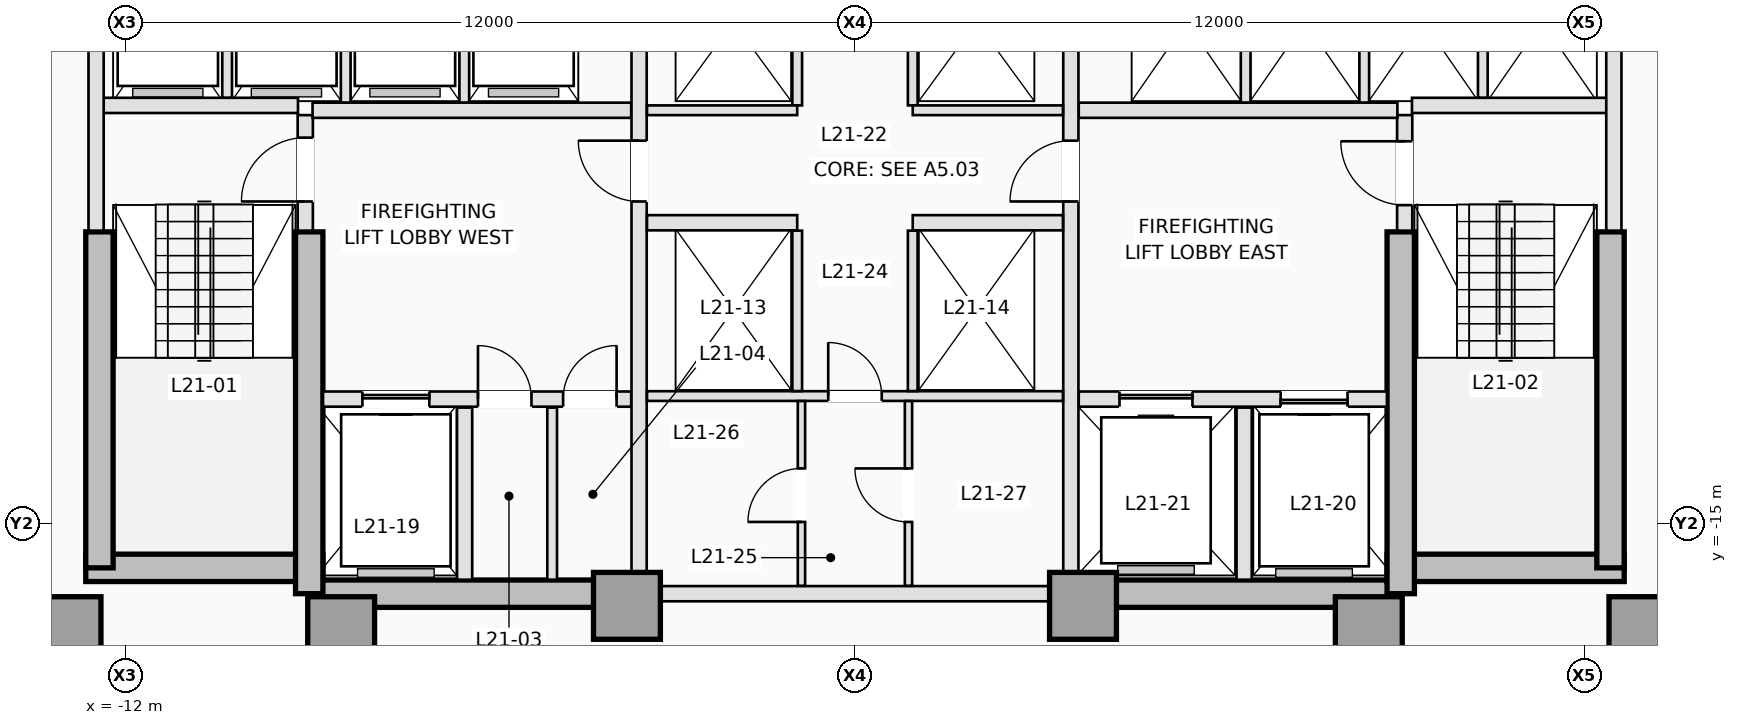
"""IFC4 building model, lengths in metres.
Left out: names, types, materials, properties, quantities, classifications, styles, units other than length and angle.
Written with IfcOpenShell. Run it as: python <this file> out.ifc"""

import sys

from ifc_helpers import new_model, si_unit, direction, frame, frame_2d, origin, origin_2d, place, context, subcontext, project, spatial, rectangle, extrude, element, fill, save


model = new_model("IFC4")
c1 = context("Model", 3, precision=1e-05, world=origin(), true_north=direction((0.0, 1.0)))
c2 = subcontext(c1, "Body", "Model", "MODEL_VIEW")
j1 = project(units=[si_unit("LENGTHUNIT", "METRE"), si_unit("PLANEANGLEUNIT", "RADIAN")], contexts=[c1])
p1 = place(None, origin())
s1 = spatial("IfcSite", under=j1, at=p1, CompositionType="ELEMENT")
p2 = place(p1, origin())
s2 = spatial("IfcBuilding", under=s1, at=p2, CompositionType="ELEMENT")
p3 = place(p2, frame((0.0, 0.0, 80.1)))
s3 = spatial("IfcBuildingStorey", under=s2, at=p3, CompositionType="ELEMENT", Elevation=80.1)
p4 = place(p3, frame((-12.65, -15.725, 0.0), z_axis=(0.0, 0.0, 1.0), x_axis=(1.0, 0.0, 0.0)))
e1 = element("IfcWall", 1, at=p4, inside=s3, PredefinedType="SHEAR", context=c2, shape_type="SweptSolid", body=[
    extrude(rectangle(XDim=3.9, YDim=0.45, at=frame_2d((1.95, 0.0))), origin(), (0.0, 0.0, 1.0), 3.5),
])
for number, where, z_axis, x_axis in (
    (2, (-8.975, -16.15, 0.0), (0.0, 0.0, 1.0), (1.0, 0.0, 0.0)),
    (3, (3.75, -16.15, 0.0), (0.0, 0.0, 1.0), (1.0, 0.0, 0.0)),
):
    element("IfcWall", number, at=place(p3, frame(where, z_axis=z_axis, x_axis=x_axis)), inside=s3, PredefinedType="SHEAR", context=c2, shape_type="SweptSolid", body=[
        extrude(rectangle(XDim=5.225, YDim=0.45, at=frame_2d((2.613, 0.0))), origin(), (0.0, 0.0, 1.0), 3.5),
    ])
p5 = place(p3, frame((8.75, -15.725, 0.0), z_axis=(0.0, 0.0, 1.0), x_axis=(1.0, 0.0, 0.0)))
e4 = element("IfcWall", 4, at=p5, inside=s3, PredefinedType="SHEAR", context=c2, shape_type="SweptSolid", body=[
    extrude(rectangle(XDim=3.9, YDim=0.45, at=frame_2d((1.95, 0.0))), origin(), (0.0, 0.0, 1.0), 3.5),
])
for number, where, z_axis, x_axis in (
    (5, (-12.425, -15.725, 0.0), (0.0, 0.0, 1.0), (0.0, 1.0, 0.0)),
    (6, (12.425, -15.725, 0.0), (0.0, 0.0, 1.0), (0.0, 1.0, 0.0)),
):
    element("IfcWall", number, at=place(p3, frame(where, z_axis=z_axis, x_axis=x_axis)), inside=s3, PredefinedType="SHEAR", context=c2, shape_type="SweptSolid", body=[
        extrude(rectangle(XDim=5.525, YDim=0.45, at=frame_2d((2.763, 0.0))), origin(), (0.0, 0.0, 1.0), 3.5),
    ])
for number, where, z_axis, x_axis in (
    (7, (-8.975, -16.15, 0.0), (0.0, 0.0, 1.0), (0.0, 1.0, 0.0)),
    (8, (8.975, -16.15, 0.0), (0.0, 0.0, 1.0), (0.0, 1.0, 0.0)),
):
    element("IfcWall", number, at=place(p3, frame(where, z_axis=z_axis, x_axis=x_axis)), inside=s3, PredefinedType="SHEAR", context=c2, shape_type="SweptSolid", body=[
        extrude(rectangle(XDim=5.95, YDim=0.45, at=frame_2d((2.975, 0.0))), origin(), (0.0, 0.0, 1.0), 3.5),
    ])
for number, where, z_axis, x_axis in (
    (9, (-12.95, -16.75, 0.0), (0.0, 0.0, 1.0), (1.0, 0.0, 0.0)),
    (10, (-8.45, -16.75, 0.0), (0.0, 0.0, 1.0), (1.0, 0.0, 0.0)),
    (11, (-3.75, -16.35, 0.0), (0.0, 0.0, 1.0), (1.0, 0.0, 0.0)),
    (12, (3.75, -16.35, 0.0), (0.0, 0.0, 1.0), (1.0, 0.0, 0.0)),
    (13, (8.45, -16.75, 0.0), (0.0, 0.0, 1.0), (1.0, 0.0, 0.0)),
    (14, (12.95, -16.75, 0.0), (0.0, 0.0, 1.0), (1.0, 0.0, 0.0)),
):
    element("IfcColumn", number, at=place(p3, frame(where, z_axis=z_axis, x_axis=x_axis)), inside=s3, PredefinedType="COLUMN", context=c2, shape_type="SweptSolid", body=[
        extrude(rectangle(XDim=1.1, YDim=1.1, at=origin_2d()), origin(), (0.0, 0.0, 1.0), 3.5),
    ])
p6 = place(p3, frame((-9.04, -10.18, 0.0), z_axis=(0.0, 0.0, 1.0), x_axis=(0.0, 1.0, 0.0)))
e15 = element("IfcWall", 15, at=p6, inside=s3, PredefinedType="PARTITIONING", context=c2, shape_type="SweptSolid", body=[
    extrude(rectangle(XDim=1.9, YDim=0.25, at=frame_2d((0.95, 0.0))), origin(), (0.0, 0.0, 1.0), 3.25),
])
p7 = place(p6, frame((0.48, 0.0, 0.0)))
e16 = element("IfcOpeningElement", 16, at=p7, cuts=e15, PredefinedType="OPENING", context=c2, shape_type="SweptSolid", body=[
    extrude(rectangle(XDim=1.05, YDim=2.15, at=frame_2d((0.525, 1.075))), frame((0.0, 0.135, 0.0), z_axis=(0.0, -1.0, 0.0), x_axis=(1.0, 0.0, 0.0)), (0.0, 0.0, 1.0), 0.27),
])
p8 = place(p3, frame((9.04, -10.18, 0.0), z_axis=(0.0, 0.0, 1.0), x_axis=(0.0, 1.0, 0.0)))
e17 = element("IfcWall", 17, at=p8, inside=s3, PredefinedType="PARTITIONING", context=c2, shape_type="SweptSolid", body=[
    extrude(rectangle(XDim=1.9, YDim=0.25, at=frame_2d((0.95, 0.0))), origin(), (0.0, 0.0, 1.0), 3.25),
])
p9 = place(p8, frame((0.42, 0.0, 0.0)))
e18 = element("IfcOpeningElement", 18, at=p9, cuts=e17, PredefinedType="OPENING", context=c2, shape_type="SweptSolid", body=[
    extrude(rectangle(XDim=1.05, YDim=2.15, at=frame_2d((0.525, 1.075))), frame((0.0, 0.135, 0.0), z_axis=(0.0, -1.0, 0.0), x_axis=(1.0, 0.0, 0.0)), (0.0, 0.0, 1.0), 0.27),
])
for number, where, z_axis, x_axis in (
    (19, (-12.38, -8.12, 0.0), (0.0, 0.0, 1.0), (1.0, 0.0, 0.0)),
    (20, (9.16, -8.12, 0.0), (0.0, 0.0, 1.0), (1.0, 0.0, 0.0)),
):
    element("IfcWall", number, at=place(p3, frame(where, z_axis=z_axis, x_axis=x_axis)), inside=s3, PredefinedType="PARTITIONING", context=c2, shape_type="SweptSolid", body=[
        extrude(rectangle(XDim=3.22, YDim=0.25, at=frame_2d((1.61, 0.0))), origin(), (0.0, 0.0, 1.0), 3.25),
    ])
for number, where, z_axis, x_axis in (
    (21, (-12.48, -10.18, 0.0), (0.0, 0.0, 1.0), (0.0, 1.0, 0.0)),
    (22, (12.48, -10.18, 0.0), (0.0, 0.0, 1.0), (0.0, 1.0, 0.0)),
):
    element("IfcWall", number, at=place(p3, frame(where, z_axis=z_axis, x_axis=x_axis)), inside=s3, PredefinedType="PARTITIONING", context=c2, shape_type="SweptSolid", body=[
        extrude(rectangle(XDim=4.828, YDim=0.25, at=frame_2d((2.414, 0.0))), origin(), (0.0, 0.0, 1.0), 3.25),
    ])
p10 = place(p3, frame((-8.748, -12.95, 0.0), z_axis=(0.0, 0.0, 1.0), x_axis=(1.0, 0.0, 0.0)))
e23 = element("IfcWall", 23, at=p10, inside=s3, PredefinedType="PARTITIONING", context=c2, shape_type="SweptSolid", body=[
    extrude(rectangle(XDim=5.068, YDim=0.25, at=frame_2d((2.534, 0.0))), origin(), (0.0, 0.0, 1.0), 3.25),
])
p11 = place(p10, frame((0.648, 0.0, 0.0)))
e24 = element("IfcOpeningElement", 24, at=p11, cuts=e23, PredefinedType="OPENING", context=c2, shape_type="SweptSolid", body=[
    extrude(rectangle(XDim=1.1, YDim=2.15, at=frame_2d((0.55, 1.075))), frame((0.0, 0.135, 0.0), z_axis=(0.0, -1.0, 0.0), x_axis=(1.0, 0.0, 0.0)), (0.0, 0.0, 1.0), 0.27),
])
p12 = place(p10, frame((2.548, 0.0, 0.0)))
e25 = element("IfcOpeningElement", 25, at=p12, cuts=e23, PredefinedType="OPENING", context=c2, shape_type="SweptSolid", body=[
    extrude(rectangle(XDim=0.88, YDim=2.1, at=frame_2d((0.44, 1.05))), frame((0.0, 0.135, 0.0), z_axis=(0.0, -1.0, 0.0), x_axis=(1.0, 0.0, 0.0)), (0.0, 0.0, 1.0), 0.27),
])
p13 = place(p10, frame((3.948, 0.0, 0.0)))
e26 = element("IfcOpeningElement", 26, at=p13, cuts=e23, PredefinedType="OPENING", context=c2, shape_type="SweptSolid", body=[
    extrude(rectangle(XDim=0.88, YDim=2.1, at=frame_2d((0.44, 1.05))), frame((0.0, 0.135, 0.0), z_axis=(0.0, -1.0, 0.0), x_axis=(1.0, 0.0, 0.0)), (0.0, 0.0, 1.0), 0.27),
])
p14 = place(p3, frame((3.68, -12.95, 0.0), z_axis=(0.0, 0.0, 1.0), x_axis=(1.0, 0.0, 0.0)))
e27 = element("IfcWall", 27, at=p14, inside=s3, PredefinedType="PARTITIONING", context=c2, shape_type="SweptSolid", body=[
    extrude(rectangle(XDim=5.068, YDim=0.25, at=frame_2d((2.534, 0.0))), origin(), (0.0, 0.0, 1.0), 3.25),
])
p15 = place(p14, frame((3.32, 0.0, 0.0)))
e28 = element("IfcOpeningElement", 28, at=p15, cuts=e27, PredefinedType="OPENING", context=c2, shape_type="SweptSolid", body=[
    extrude(rectangle(XDim=1.1, YDim=2.15, at=frame_2d((0.55, 1.075))), frame((0.0, 0.135, 0.0), z_axis=(0.0, -1.0, 0.0), x_axis=(1.0, 0.0, 0.0)), (0.0, 0.0, 1.0), 0.27),
])
p16 = place(p14, frame((0.67, 0.0, 0.0)))
e29 = element("IfcOpeningElement", 29, at=p16, cuts=e27, PredefinedType="OPENING", context=c2, shape_type="SweptSolid", body=[
    extrude(rectangle(XDim=1.2, YDim=2.15, at=frame_2d((0.6, 1.075))), frame((0.0, 0.135, 0.0), z_axis=(0.0, -1.0, 0.0), x_axis=(1.0, 0.0, 0.0)), (0.0, 0.0, 1.0), 0.27),
])
p17 = place(p3, frame((-6.42, -15.92, 0.0), z_axis=(0.0, 0.0, 1.0), x_axis=(0.0, 1.0, 0.0)))
e30 = element("IfcWall", 30, at=p17, inside=s3, PredefinedType="PARTITIONING", context=c2, shape_type="SweptSolid", body=[
    extrude(rectangle(XDim=2.83, YDim=0.25, at=frame_2d((1.415, 0.0))), origin(), (0.0, 0.0, 1.0), 3.25),
])
p18 = place(p3, frame((-4.98, -15.92, 0.0), z_axis=(0.0, 0.0, 1.0), x_axis=(0.0, 1.0, 0.0)))
e31 = element("IfcWall", 31, at=p18, inside=s3, PredefinedType="PARTITIONING", context=c2, shape_type="SweptSolid", body=[
    extrude(rectangle(XDim=2.83, YDim=0.16, at=frame_2d((1.415, 0.0))), origin(), (0.0, 0.0, 1.0), 3.25),
])
p19 = place(p3, frame((6.4, -15.92, 0.0), z_axis=(0.0, 0.0, 1.0), x_axis=(0.0, 1.0, 0.0)))
e32 = element("IfcWall", 32, at=p19, inside=s3, PredefinedType="PARTITIONING", context=c2, shape_type="SweptSolid", body=[
    extrude(rectangle(XDim=2.83, YDim=0.25, at=frame_2d((1.415, 0.0))), origin(), (0.0, 0.0, 1.0), 3.25),
])
for number, where, z_axis, x_axis in (
    (33, (-8.92, -8.2, 0.0), (0.0, 0.0, 1.0), (1.0, 0.0, 0.0)),
    (34, (3.68, -8.2, 0.0), (0.0, 0.0, 1.0), (1.0, 0.0, 0.0)),
):
    element("IfcWall", number, at=place(p3, frame(where, z_axis=z_axis, x_axis=x_axis)), inside=s3, PredefinedType="PARTITIONING", context=c2, shape_type="SweptSolid", body=[
        extrude(rectangle(XDim=5.24, YDim=0.25, at=frame_2d((2.62, 0.0))), origin(), (0.0, 0.0, 1.0), 3.25),
    ])
p20 = place(p3, frame((-3.55, -15.798, 0.0), z_axis=(0.0, 0.0, 1.0), x_axis=(0.0, 1.0, 0.0)))
e35 = element("IfcWall", 35, at=p20, inside=s3, PredefinedType="PARTITIONING", context=c2, shape_type="SweptSolid", body=[
    extrude(rectangle(XDim=10.446, YDim=0.25, at=frame_2d((5.223, 0.0))), origin(), (0.0, 0.0, 1.0), 3.25),
])
p21 = place(p20, frame((6.098, 0.0, 0.0)))
e36 = element("IfcOpeningElement", 36, at=p21, cuts=e35, PredefinedType="OPENING", context=c2, shape_type="SweptSolid", body=[
    extrude(rectangle(XDim=1.0, YDim=2.15, at=frame_2d((0.5, 1.075))), frame((0.0, 0.135, 0.0), z_axis=(0.0, -1.0, 0.0), x_axis=(1.0, 0.0, 0.0)), (0.0, 0.0, 1.0), 0.27),
])
p22 = place(p3, frame((3.55, -15.798, 0.0), z_axis=(0.0, 0.0, 1.0), x_axis=(0.0, 1.0, 0.0)))
e37 = element("IfcWall", 37, at=p22, inside=s3, PredefinedType="PARTITIONING", context=c2, shape_type="SweptSolid", body=[
    extrude(rectangle(XDim=10.446, YDim=0.25, at=frame_2d((5.223, 0.0))), origin(), (0.0, 0.0, 1.0), 3.25),
])
p23 = place(p22, frame((6.098, 0.0, 0.0)))
e38 = element("IfcOpeningElement", 38, at=p23, cuts=e37, PredefinedType="OPENING", context=c2, shape_type="SweptSolid", body=[
    extrude(rectangle(XDim=1.0, YDim=2.15, at=frame_2d((0.5, 1.075))), frame((0.0, 0.135, 0.0), z_axis=(0.0, -1.0, 0.0), x_axis=(1.0, 0.0, 0.0)), (0.0, 0.0, 1.0), 0.27),
])
p24 = place(p3, frame((-10.325, -7.993, 0.0), z_axis=(0.0, 0.0, 1.0), x_axis=(0.0, 1.0, 0.0)))
e39 = element("IfcWall", 39, at=p24, inside=s3, PredefinedType="PARTITIONING", context=c2, shape_type="SweptSolid", body=[
    extrude(rectangle(XDim=2.653, YDim=0.16, at=frame_2d((1.326, 0.0))), origin(), (0.0, 0.0, 1.0), 3.25),
])
for number, where, z_axis, x_axis in (
    (40, (-8.375, -8.073, 0.0), (0.0, 0.0, 1.0), (0.0, 1.0, 0.0)),
    (41, (-6.425, -8.073, 0.0), (0.0, 0.0, 1.0), (0.0, 1.0, 0.0)),
    (42, (6.425, -8.073, 0.0), (0.0, 0.0, 1.0), (0.0, 1.0, 0.0)),
    (43, (8.375, -8.073, 0.0), (0.0, 0.0, 1.0), (0.0, 1.0, 0.0)),
):
    element("IfcWall", number, at=place(p3, frame(where, z_axis=z_axis, x_axis=x_axis)), inside=s3, PredefinedType="PARTITIONING", context=c2, shape_type="SweptSolid", body=[
        extrude(rectangle(XDim=2.733, YDim=0.16, at=frame_2d((1.366, 0.0))), origin(), (0.0, 0.0, 1.0), 3.25),
    ])
p25 = place(p3, frame((10.325, -7.993, 0.0), z_axis=(0.0, 0.0, 1.0), x_axis=(0.0, 1.0, 0.0)))
e44 = element("IfcWall", 44, at=p25, inside=s3, PredefinedType="PARTITIONING", context=c2, shape_type="SweptSolid", body=[
    extrude(rectangle(XDim=2.653, YDim=0.16, at=frame_2d((1.326, 0.0))), origin(), (0.0, 0.0, 1.0), 3.25),
])
p26 = place(p3, frame((-3.198, -16.15, 0.0), z_axis=(0.0, 0.0, 1.0), x_axis=(1.0, 0.0, 0.0)))
e45 = element("IfcWall", 45, at=p26, inside=s3, PredefinedType="PARTITIONING", context=c2, shape_type="SweptSolid", body=[
    extrude(rectangle(XDim=6.396, YDim=0.25, at=frame_2d((3.198, 0.0))), origin(), (0.0, 0.0, 1.0), 2.3),
])
for number, where, z_axis, x_axis in (
    (46, (-0.95, -8.12, 0.0), (0.0, 0.0, 1.0), (0.0, 1.0, 0.0)),
    (47, (0.95, -8.12, 0.0), (0.0, 0.0, 1.0), (0.0, 1.0, 0.0)),
):
    element("IfcWall", number, at=place(p3, frame(where, z_axis=z_axis, x_axis=x_axis)), inside=s3, PredefinedType="PARTITIONING", context=c2, shape_type="SweptSolid", body=[
        extrude(rectangle(XDim=2.78, YDim=0.16, at=frame_2d((1.39, 0.0))), origin(), (0.0, 0.0, 1.0), 3.25),
    ])
for number, where, z_axis, x_axis in (
    (48, (-3.42, -8.2, 0.0), (0.0, 0.0, 1.0), (1.0, 0.0, 0.0)),
    (49, (0.95, -8.2, 0.0), (0.0, 0.0, 1.0), (1.0, 0.0, 0.0)),
):
    element("IfcWall", number, at=place(p3, frame(where, z_axis=z_axis, x_axis=x_axis)), inside=s3, PredefinedType="PARTITIONING", context=c2, shape_type="SweptSolid", body=[
        extrude(rectangle(XDim=2.47, YDim=0.16, at=frame_2d((1.235, 0.0))), origin(), (0.0, 0.0, 1.0), 3.25),
    ])
for number, where, z_axis, x_axis in (
    (50, (-3.42, -10.05, 0.0), (0.0, 0.0, 1.0), (1.0, 0.0, 0.0)),
    (51, (0.95, -10.05, 0.0), (0.0, 0.0, 1.0), (1.0, 0.0, 0.0)),
):
    element("IfcWall", number, at=place(p3, frame(where, z_axis=z_axis, x_axis=x_axis)), inside=s3, PredefinedType="PARTITIONING", context=c2, shape_type="SweptSolid", body=[
        extrude(rectangle(XDim=2.47, YDim=0.25, at=frame_2d((1.235, 0.0))), origin(), (0.0, 0.0, 1.0), 3.25),
    ])
p27 = place(p3, frame((-3.42, -12.9, 0.0), z_axis=(0.0, 0.0, 1.0), x_axis=(1.0, 0.0, 0.0)))
e52 = element("IfcWall", 52, at=p27, inside=s3, PredefinedType="PARTITIONING", context=c2, shape_type="SweptSolid", body=[
    extrude(rectangle(XDim=6.84, YDim=0.16, at=frame_2d((3.42, 0.0))), origin(), (0.0, 0.0, 1.0), 3.25),
])
p28 = place(p27, frame((2.98, 0.0, 0.0)))
e53 = element("IfcOpeningElement", 53, at=p28, cuts=e52, PredefinedType="OPENING", context=c2, shape_type="SweptSolid", body=[
    extrude(rectangle(XDim=0.88, YDim=2.12, at=frame_2d((0.44, 1.06))), frame((0.0, 0.09, 0.0), z_axis=(0.0, -1.0, 0.0), x_axis=(1.0, 0.0, 0.0)), (0.0, 0.0, 1.0), 0.18),
])
for number, where, z_axis, x_axis in (
    (54, (-0.95, -12.818, 0.0), (0.0, 0.0, 1.0), (0.0, 1.0, 0.0)),
    (55, (0.95, -12.818, 0.0), (0.0, 0.0, 1.0), (0.0, 1.0, 0.0)),
):
    element("IfcWall", number, at=place(p3, frame(where, z_axis=z_axis, x_axis=x_axis)), inside=s3, PredefinedType="PARTITIONING", context=c2, shape_type="SweptSolid", body=[
        extrude(rectangle(XDim=2.638, YDim=0.16, at=frame_2d((1.319, 0.0))), origin(), (0.0, 0.0, 1.0), 3.25),
    ])
p29 = place(p3, frame((-0.88, -16.02, 0.0), z_axis=(0.0, 0.0, 1.0), x_axis=(0.0, 1.0, 0.0)))
e56 = element("IfcWall", 56, at=p29, inside=s3, PredefinedType="PARTITIONING", context=c2, shape_type="SweptSolid", body=[
    extrude(rectangle(XDim=3.038, YDim=0.12, at=frame_2d((1.519, 0.0))), origin(), (0.0, 0.0, 1.0), 3.25),
])
p30 = place(p29, frame((1.05, 0.0, 0.0)))
e57 = element("IfcOpeningElement", 57, at=p30, cuts=e56, PredefinedType="OPENING", context=c2, shape_type="SweptSolid", body=[
    extrude(rectangle(XDim=0.88, YDim=2.12, at=frame_2d((0.44, 1.06))), frame((0.0, 0.07, 0.0), z_axis=(0.0, -1.0, 0.0), x_axis=(1.0, 0.0, 0.0)), (0.0, 0.0, 1.0), 0.14),
])
p31 = place(p3, frame((0.88, -16.02, 0.0), z_axis=(0.0, 0.0, 1.0), x_axis=(0.0, 1.0, 0.0)))
e58 = element("IfcWall", 58, at=p31, inside=s3, PredefinedType="PARTITIONING", context=c2, shape_type="SweptSolid", body=[
    extrude(rectangle(XDim=3.038, YDim=0.12, at=frame_2d((1.519, 0.0))), origin(), (0.0, 0.0, 1.0), 3.25),
])
p32 = place(p31, frame((1.05, 0.0, 0.0)))
e59 = element("IfcOpeningElement", 59, at=p32, cuts=e58, PredefinedType="OPENING", context=c2, shape_type="SweptSolid", body=[
    extrude(rectangle(XDim=0.88, YDim=2.12, at=frame_2d((0.44, 1.06))), frame((0.0, 0.07, 0.0), z_axis=(0.0, -1.0, 0.0), x_axis=(1.0, 0.0, 0.0)), (0.0, 0.0, 1.0), 0.14),
])
p33 = place(p11, origin())
e60 = element("IfcDoor", 60, at=p33, inside=s3, OperationType="SLIDING_TO_LEFT", PredefinedType="DOOR", context=c2, shape_type="SweptSolid", body=[
    extrude(rectangle(XDim=1.1, YDim=2.15, at=frame_2d((0.55, 1.075))), frame((0.0, 0.025, 0.0), z_axis=(0.0, -1.0, 0.0), x_axis=(1.0, 0.0, 0.0)), (0.0, 0.0, 1.0), 0.05),
])
fill(e24, e60)
p34 = place(p15, origin())
e61 = element("IfcDoor", 61, at=p34, inside=s3, OperationType="SLIDING_TO_RIGHT", PredefinedType="DOOR", context=c2, shape_type="SweptSolid", body=[
    extrude(rectangle(XDim=1.1, YDim=2.15, at=frame_2d((0.55, 1.075))), frame((0.0, 0.025, 0.0), z_axis=(0.0, -1.0, 0.0), x_axis=(1.0, 0.0, 0.0)), (0.0, 0.0, 1.0), 0.05),
])
fill(e28, e61)
p35 = place(p16, origin())
e62 = element("IfcDoor", 62, at=p35, inside=s3, OperationType="SLIDING_TO_LEFT", PredefinedType="DOOR", context=c2, shape_type="SweptSolid", body=[
    extrude(rectangle(XDim=1.2, YDim=2.15, at=frame_2d((0.6, 1.075))), frame((0.0, 0.025, 0.0), z_axis=(0.0, -1.0, 0.0), x_axis=(1.0, 0.0, 0.0)), (0.0, 0.0, 1.0), 0.05),
])
fill(e29, e62)
p36 = place(p7, origin())
e63 = element("IfcDoor", 63, at=p36, inside=s3, OperationType="SINGLE_SWING_LEFT", PredefinedType="DOOR", context=c2, shape_type="SweptSolid", body=[
    extrude(rectangle(XDim=1.05, YDim=2.15, at=frame_2d((0.525, 1.075))), frame((0.0, 0.025, 0.0), z_axis=(0.0, -1.0, 0.0), x_axis=(1.0, 0.0, 0.0)), (0.0, 0.0, 1.0), 0.05),
])
fill(e16, e63)
p37 = place(p9, origin())
e64 = element("IfcDoor", 64, at=p37, inside=s3, OperationType="SINGLE_SWING_RIGHT", PredefinedType="DOOR", context=c2, shape_type="SweptSolid", body=[
    extrude(rectangle(XDim=1.05, YDim=2.15, at=frame_2d((0.525, 1.075))), frame((0.0, 0.025, 0.0), z_axis=(0.0, -1.0, 0.0), x_axis=(1.0, 0.0, 0.0)), (0.0, 0.0, 1.0), 0.05),
])
fill(e18, e64)
p38 = place(p12, origin())
e65 = element("IfcDoor", 65, at=p38, inside=s3, OperationType="SINGLE_SWING_LEFT", PredefinedType="TRAPDOOR", context=c2, shape_type="SweptSolid", body=[
    extrude(rectangle(XDim=0.88, YDim=2.1, at=frame_2d((0.44, 1.05))), frame((0.0, 0.025, 0.0), z_axis=(0.0, -1.0, 0.0), x_axis=(1.0, 0.0, 0.0)), (0.0, 0.0, 1.0), 0.05),
])
fill(e25, e65)
p39 = place(p13, origin())
e66 = element("IfcDoor", 66, at=p39, inside=s3, OperationType="SINGLE_SWING_RIGHT", PredefinedType="TRAPDOOR", context=c2, shape_type="SweptSolid", body=[
    extrude(rectangle(XDim=0.88, YDim=2.1, at=frame_2d((0.44, 1.05))), frame((0.0, 0.025, 0.0), z_axis=(0.0, -1.0, 0.0), x_axis=(1.0, 0.0, 0.0)), (0.0, 0.0, 1.0), 0.05),
])
fill(e26, e66)
p40 = place(p21, origin())
e67 = element("IfcDoor", 67, at=p40, inside=s3, OperationType="SINGLE_SWING_RIGHT", PredefinedType="DOOR", context=c2, shape_type="SweptSolid", body=[
    extrude(rectangle(XDim=1.0, YDim=2.15, at=frame_2d((0.5, 1.075))), frame((0.0, 0.025, 0.0), z_axis=(0.0, -1.0, 0.0), x_axis=(1.0, 0.0, 0.0)), (0.0, 0.0, 1.0), 0.05),
])
fill(e36, e67)
p41 = place(p23, origin())
e68 = element("IfcDoor", 68, at=p41, inside=s3, OperationType="SINGLE_SWING_LEFT", PredefinedType="DOOR", context=c2, shape_type="SweptSolid", body=[
    extrude(rectangle(XDim=1.0, YDim=2.15, at=frame_2d((0.5, 1.075))), frame((0.0, 0.025, 0.0), z_axis=(0.0, -1.0, 0.0), x_axis=(1.0, 0.0, 0.0)), (0.0, 0.0, 1.0), 0.05),
])
fill(e38, e68)
p42 = place(p28, origin())
e69 = element("IfcDoor", 69, at=p42, inside=s3, OperationType="SINGLE_SWING_LEFT", PredefinedType="DOOR", context=c2, shape_type="SweptSolid", body=[
    extrude(rectangle(XDim=0.88, YDim=2.12, at=frame_2d((0.44, 1.06))), frame((0.0, 0.025, 0.0), z_axis=(0.0, -1.0, 0.0), x_axis=(1.0, 0.0, 0.0)), (0.0, 0.0, 1.0), 0.05),
])
fill(e53, e69)
p43 = place(p30, origin())
e70 = element("IfcDoor", 70, at=p43, inside=s3, OperationType="SINGLE_SWING_LEFT", PredefinedType="DOOR", context=c2, shape_type="SweptSolid", body=[
    extrude(rectangle(XDim=0.88, YDim=2.12, at=frame_2d((0.44, 1.06))), frame((0.0, 0.025, 0.0), z_axis=(0.0, -1.0, 0.0), x_axis=(1.0, 0.0, 0.0)), (0.0, 0.0, 1.0), 0.05),
])
fill(e57, e70)
p44 = place(p32, origin())
e71 = element("IfcDoor", 71, at=p44, inside=s3, OperationType="SINGLE_SWING_RIGHT", PredefinedType="DOOR", context=c2, shape_type="SweptSolid", body=[
    extrude(rectangle(XDim=0.88, YDim=2.12, at=frame_2d((0.44, 1.06))), frame((0.0, 0.025, 0.0), z_axis=(0.0, -1.0, 0.0), x_axis=(1.0, 0.0, 0.0)), (0.0, 0.0, 1.0), 0.05),
])
fill(e59, e71)
save(model, sys.argv[1])
